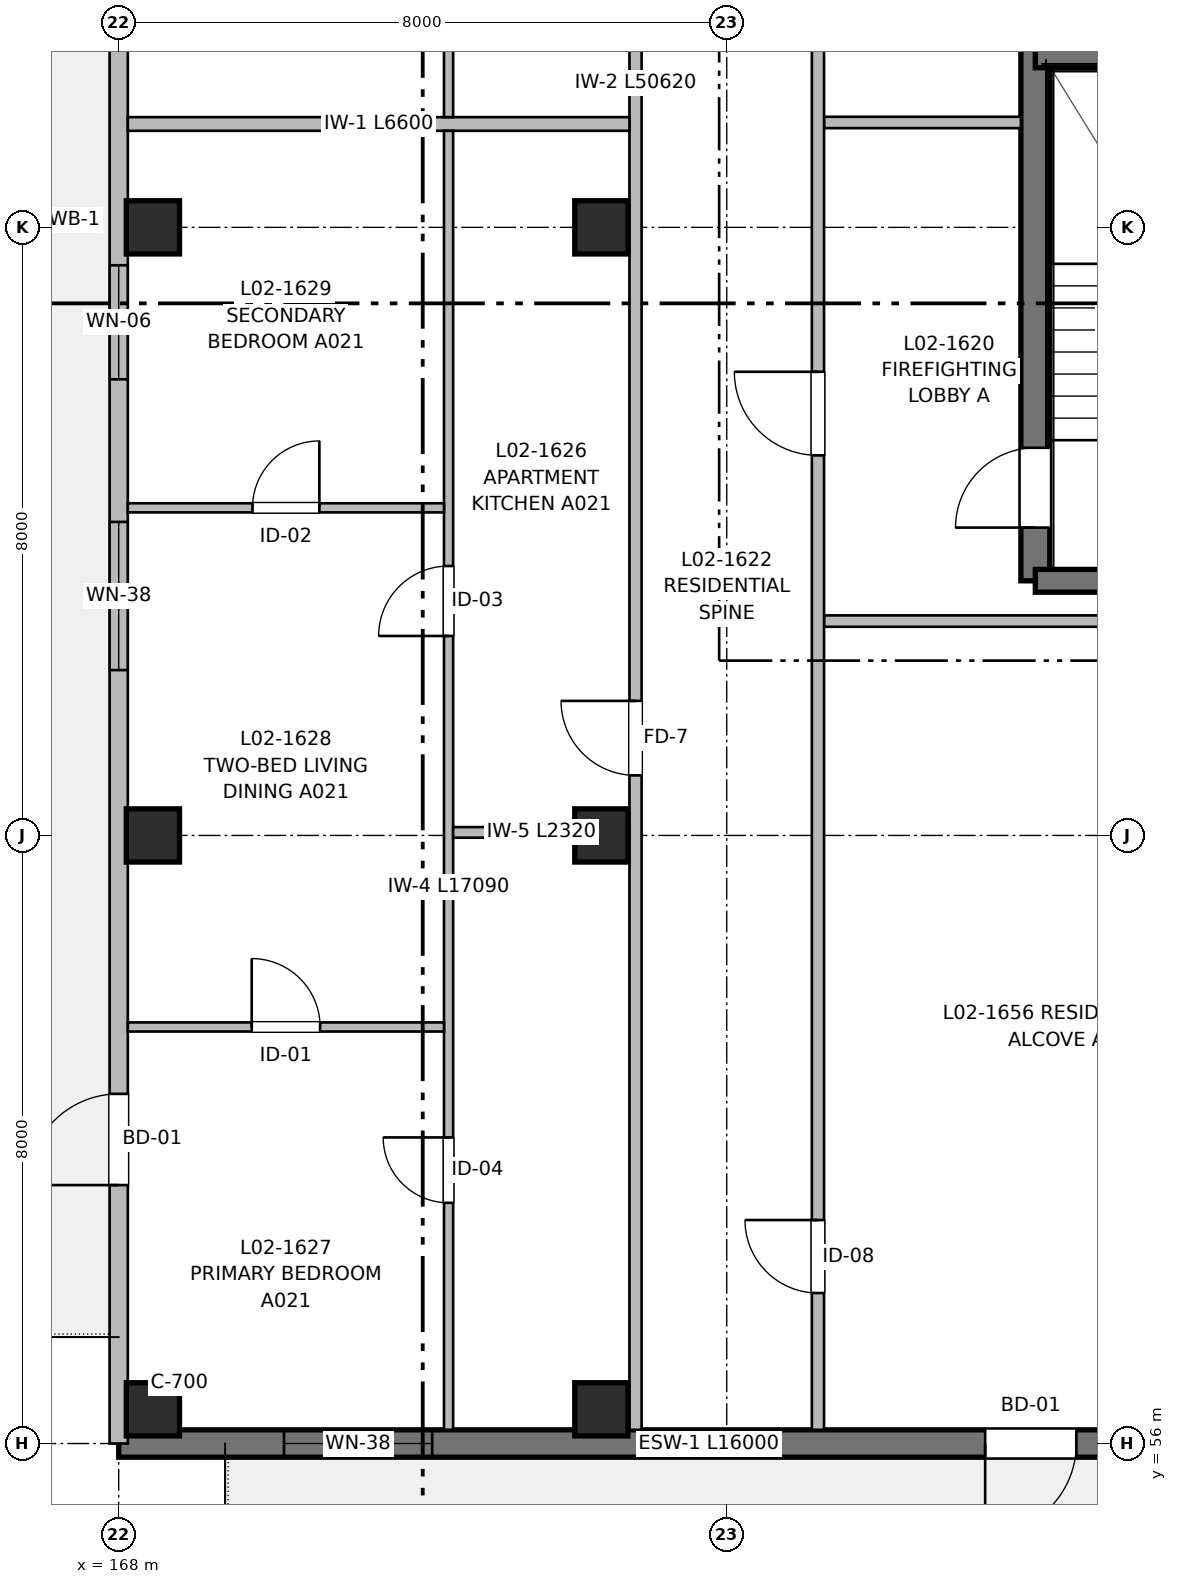
"""IFC4 building model, lengths in metres.
Left out: names, types, materials, properties, quantities, classifications, styles, units other than length and angle.
Written with IfcOpenShell. Run it as: python <this file> out.ifc"""

import sys

from ifc_helpers import new_model, si_unit, direction, frame, frame_2d, origin, origin_2d, place, context, subcontext, project, spatial, rectangle, extrude, element, fill, save


model = new_model("IFC4")
c1 = context("Model", 3, precision=1e-05, world=origin(), true_north=direction((0.0, 1.0)))
c2 = subcontext(c1, "Body", "Model", "MODEL_VIEW")
j1 = project(units=[si_unit("LENGTHUNIT", "METRE"), si_unit("PLANEANGLEUNIT", "RADIAN")], contexts=[c1])
p1 = place(None, origin())
s1 = spatial("IfcSite", under=j1, at=p1, CompositionType="ELEMENT")
p2 = place(p1, origin())
s2 = spatial("IfcBuilding", under=s1, at=p2, CompositionType="ELEMENT")
p3 = place(p2, frame((0.0, 0.0, 7.36)))
s3 = spatial("IfcBuildingStorey", under=s2, at=p3, CompositionType="ELEMENT", Elevation=7.36)
for number, where, z_axis, x_axis in (
    (1, (168.45, 56.45, 0.0), (0.0, 0.0, 1.0), (1.0, 0.0, 0.0)),
    (2, (168.45, 64.0, 0.0), (0.0, 0.0, 1.0), (1.0, 0.0, 0.0)),
    (3, (168.45, 72.0, 0.0), (0.0, 0.0, 1.0), (1.0, 0.0, 0.0)),
    (4, (174.35, 56.45, 0.0), (0.0, 0.0, 1.0), (1.0, 0.0, 0.0)),
    (5, (174.35, 64.0, 0.0), (0.0, 0.0, 1.0), (1.0, 0.0, 0.0)),
    (6, (174.35, 72.0, 0.0), (0.0, 0.0, 1.0), (1.0, 0.0, 0.0)),
):
    element("IfcColumn", number, at=place(p3, frame(where, z_axis=z_axis, x_axis=x_axis)), inside=s3, PredefinedType="COLUMN", context=c2, shape_type="SweptSolid", body=[
        extrude(rectangle(XDim=0.7, YDim=0.7, at=origin_2d()), origin(), (0.0, 0.0, 1.0), 3.2),
    ])
p4 = place(p3, frame((180.06, 67.35, 0.0), z_axis=(0.0, 0.0, 1.0), x_axis=(0.0, 1.0, 0.0)))
e7 = element("IfcWall", 7, at=p4, inside=s3, PredefinedType="SHEAR", context=c2, shape_type="SweptSolid", body=[
    extrude(rectangle(XDim=13.15, YDim=0.38, at=frame_2d((6.575, 0.0))), origin(), (0.0, 0.0, 1.0), 3.2),
])
p5 = place(p4, frame((0.7, 0.0, 0.0)))
e8 = element("IfcOpeningElement", 8, at=p5, cuts=e7, PredefinedType="OPENING", context=c2, shape_type="SweptSolid", body=[
    extrude(rectangle(XDim=1.05, YDim=2.15, at=frame_2d((0.525, 1.075))), frame((0.0, 0.2, 0.0), z_axis=(0.0, -1.0, 0.0), x_axis=(1.0, 0.0, 0.0)), (0.0, 0.0, 1.0), 0.4),
])
p6 = place(p3, frame((183.47, 67.35, 0.0), z_axis=(0.0, 0.0, 1.0), x_axis=(-1.0, 0.0, 0.0)))
e9 = element("IfcWall", 9, at=p6, inside=s3, PredefinedType="SHEAR", context=c2, shape_type="SweptSolid", body=[
    extrude(rectangle(XDim=3.41, YDim=0.3, at=frame_2d((1.705, 0.0))), origin(), (0.0, 0.0, 1.0), 3.2),
])
p7 = place(p3, frame((180.06, 74.24, 0.0), z_axis=(0.0, 0.0, 1.0), x_axis=(1.0, 0.0, 0.0)))
e10 = element("IfcWall", 10, at=p7, inside=s3, PredefinedType="SHEAR", context=c2, shape_type="SweptSolid", body=[
    extrude(rectangle(XDim=3.41, YDim=0.28, at=frame_2d((1.705, 0.0))), origin(), (0.0, 0.0, 1.0), 3.2),
])
p8 = place(p3, frame((184.0, 56.0, 0.0), z_axis=(0.0, 0.0, 1.0), x_axis=(-1.0, 0.0, 0.0)))
e11 = element("IfcWall", 11, at=p8, inside=s3, PredefinedType="SHEAR", context=c2, shape_type="SweptSolid", body=[
    extrude(rectangle(XDim=16.0, YDim=0.36, at=frame_2d((8.0, 0.0))), origin(), (0.0, 0.0, 1.0), 2.98),
])
p9 = place(p8, frame((3.4, 0.0, 0.0)))
e12 = element("IfcOpeningElement", 12, at=p9, cuts=e11, PredefinedType="OPENING", context=c2, shape_type="SweptSolid", body=[
    extrude(rectangle(XDim=1.2, YDim=2.2, at=frame_2d((0.6, 1.1))), frame((0.0, 0.19, 0.0), z_axis=(0.0, -1.0, 0.0), x_axis=(1.0, 0.0, 0.0)), (0.0, 0.0, 1.0), 0.38),
])
p10 = place(p8, frame((11.875, 0.0, 0.72)))
e13 = element("IfcOpeningElement", 13, at=p10, cuts=e11, PredefinedType="OPENING", context=c2, shape_type="SweptSolid", body=[
    extrude(rectangle(XDim=1.95, YDim=1.5, at=frame_2d((0.975, 0.75))), frame((0.0, 0.19, 0.0), z_axis=(0.0, -1.0, 0.0), x_axis=(1.0, 0.0, 0.0)), (0.0, 0.0, 1.0), 0.38),
])
p11 = place(p3, frame((168.0, 56.0, 0.0), z_axis=(0.0, 0.0, 1.0), x_axis=(0.0, 1.0, 0.0)))
e14 = element("IfcWall", 14, at=p11, inside=s3, PredefinedType="SOLIDWALL", context=c2, shape_type="SweptSolid", body=[
    extrude(rectangle(XDim=32.0, YDim=0.24, at=frame_2d((16.0, 0.0))), origin(), (0.0, 0.0, 1.0), 2.98),
])
p12 = place(p11, frame((3.4, 0.0, 0.0)))
e15 = element("IfcOpeningElement", 15, at=p12, cuts=e14, PredefinedType="OPENING", context=c2, shape_type="SweptSolid", body=[
    extrude(rectangle(XDim=1.2, YDim=2.2, at=frame_2d((0.6, 1.1))), frame((0.0, 0.13, 0.0), z_axis=(0.0, -1.0, 0.0), x_axis=(1.0, 0.0, 0.0)), (0.0, 0.0, 1.0), 0.26),
])
p13 = place(p11, frame((10.175, 0.0, 0.72)))
e16 = element("IfcOpeningElement", 16, at=p13, cuts=e14, PredefinedType="OPENING", context=c2, shape_type="SweptSolid", body=[
    extrude(rectangle(XDim=1.95, YDim=1.5, at=frame_2d((0.975, 0.75))), frame((0.0, 0.13, 0.0), z_axis=(0.0, -1.0, 0.0), x_axis=(1.0, 0.0, 0.0)), (0.0, 0.0, 1.0), 0.26),
])
p14 = place(p11, frame((18.7, 0.0, 0.67)))
e17 = element("IfcOpeningElement", 17, at=p14, cuts=e14, PredefinedType="OPENING", context=c2, shape_type="SweptSolid", body=[
    extrude(rectangle(XDim=2.6, YDim=1.55, at=frame_2d((1.3, 0.775))), frame((0.0, 0.13, 0.0), z_axis=(0.0, -1.0, 0.0), x_axis=(1.0, 0.0, 0.0)), (0.0, 0.0, 1.0), 0.26),
])
p15 = place(p11, frame((27.16, 0.0, 0.72)))
e18 = element("IfcOpeningElement", 18, at=p15, cuts=e14, PredefinedType="OPENING", context=c2, shape_type="SweptSolid", body=[
    extrude(rectangle(XDim=1.68, YDim=1.5, at=frame_2d((0.84, 0.75))), frame((0.0, 0.13, 0.0), z_axis=(0.0, -1.0, 0.0), x_axis=(1.0, 0.0, 0.0)), (0.0, 0.0, 1.0), 0.26),
])
p16 = place(p11, frame((14.001, 0.0, 0.82)))
e19 = element("IfcOpeningElement", 19, at=p16, cuts=e14, PredefinedType="OPENING", context=c2, shape_type="SweptSolid", body=[
    extrude(rectangle(XDim=1.5, YDim=1.4, at=frame_2d((0.75, 0.7))), frame((0.0, 0.13, 0.0), z_axis=(0.0, -1.0, 0.0), x_axis=(1.0, 0.0, 0.0)), (0.0, 0.0, 1.0), 0.26),
])
p17 = place(p11, frame((29.95, 0.0, 0.82)))
e20 = element("IfcOpeningElement", 20, at=p17, cuts=e14, PredefinedType="OPENING", context=c2, shape_type="SweptSolid", body=[
    extrude(rectangle(XDim=1.5, YDim=1.4, at=frame_2d((0.75, 0.7))), frame((0.0, 0.13, 0.0), z_axis=(0.0, -1.0, 0.0), x_axis=(1.0, 0.0, 0.0)), (0.0, 0.0, 1.0), 0.26),
])
p18 = place(p3, frame((177.28, 66.82, 0.0), z_axis=(0.0, 0.0, 1.0), x_axis=(1.0, 0.0, 0.0)))
e21 = element("IfcWall", 21, at=p18, inside=s3, PredefinedType="PARTITIONING", context=c2, shape_type="SweptSolid", body=[
    extrude(rectangle(XDim=6.6, YDim=0.15, at=frame_2d((3.3, 0.0))), origin(), (0.0, 0.0, 1.0), 2.935),
])
p19 = place(p3, frame((177.28, 73.38, 0.0), z_axis=(0.0, 0.0, 1.0), x_axis=(1.0, 0.0, 0.0)))
e22 = element("IfcWall", 22, at=p19, inside=s3, PredefinedType="PARTITIONING", context=c2, shape_type="SweptSolid", body=[
    extrude(rectangle(XDim=2.59, YDim=0.15, at=frame_2d((1.295, 0.0))), origin(), (0.0, 0.0, 1.0), 2.935),
])
p20 = place(p3, frame((174.8, 56.18, 0.0), z_axis=(0.0, 0.0, 1.0), x_axis=(0.0, 1.0, 0.0)))
e23 = element("IfcWall", 23, at=p20, inside=s3, PredefinedType="PARTITIONING", context=c2, shape_type="SweptSolid", body=[
    extrude(rectangle(XDim=50.62, YDim=0.16, at=frame_2d((25.31, 0.0))), origin(), (0.0, 0.0, 1.0), 2.935),
])
p21 = place(p20, frame((8.61, 0.0, 0.0)))
e24 = element("IfcOpeningElement", 24, at=p21, cuts=e23, PredefinedType="OPENING", context=c2, shape_type="SweptSolid", body=[
    extrude(rectangle(XDim=0.98, YDim=2.15, at=frame_2d((0.49, 1.075))), frame((0.0, 0.09, 0.0), z_axis=(0.0, -1.0, 0.0), x_axis=(1.0, 0.0, 0.0)), (0.0, 0.0, 1.0), 0.18),
])
p22 = place(p20, frame((25.84, 0.0, 0.0)))
e25 = element("IfcOpeningElement", 25, at=p22, cuts=e23, PredefinedType="OPENING", context=c2, shape_type="SweptSolid", body=[
    extrude(rectangle(XDim=0.98, YDim=2.15, at=frame_2d((0.49, 1.075))), frame((0.0, 0.09, 0.0), z_axis=(0.0, -1.0, 0.0), x_axis=(1.0, 0.0, 0.0)), (0.0, 0.0, 1.0), 0.18),
])
p23 = place(p20, frame((42.61, 0.0, 0.0)))
e26 = element("IfcOpeningElement", 26, at=p23, cuts=e23, PredefinedType="OPENING", context=c2, shape_type="SweptSolid", body=[
    extrude(rectangle(XDim=0.98, YDim=2.15, at=frame_2d((0.49, 1.075))), frame((0.0, 0.09, 0.0), z_axis=(0.0, -1.0, 0.0), x_axis=(1.0, 0.0, 0.0)), (0.0, 0.0, 1.0), 0.18),
])
p24 = place(p3, frame((177.2, 56.18, 0.0), z_axis=(0.0, 0.0, 1.0), x_axis=(0.0, 1.0, 0.0)))
e27 = element("IfcWall", 27, at=p24, inside=s3, PredefinedType="PARTITIONING", context=c2, shape_type="SweptSolid", body=[
    extrude(rectangle(XDim=50.62, YDim=0.16, at=frame_2d((25.31, 0.0))), origin(), (0.0, 0.0, 1.0), 2.935),
])
p25 = place(p24, frame((12.82, 0.0, 0.0)))
e28 = element("IfcOpeningElement", 28, at=p25, cuts=e27, PredefinedType="OPENING", context=c2, shape_type="SweptSolid", body=[
    extrude(rectangle(XDim=1.1, YDim=2.15, at=frame_2d((0.55, 1.075))), frame((0.0, 0.09, 0.0), z_axis=(0.0, -1.0, 0.0), x_axis=(1.0, 0.0, 0.0)), (0.0, 0.0, 1.0), 0.18),
])
p26 = place(p24, frame((19.22, 0.0, 0.0)))
e29 = element("IfcOpeningElement", 29, at=p26, cuts=e27, PredefinedType="OPENING", context=c2, shape_type="SweptSolid", body=[
    extrude(rectangle(XDim=1.6, YDim=2.15, at=frame_2d((0.8, 1.075))), frame((0.0, 0.09, 0.0), z_axis=(0.0, -1.0, 0.0), x_axis=(1.0, 0.0, 0.0)), (0.0, 0.0, 1.0), 0.18),
])
p27 = place(p24, frame((1.8, 0.0, 0.0)))
e30 = element("IfcOpeningElement", 30, at=p27, cuts=e27, PredefinedType="OPENING", context=c2, shape_type="SweptSolid", body=[
    extrude(rectangle(XDim=0.96, YDim=2.15, at=frame_2d((0.48, 1.075))), frame((0.0, 0.09, 0.0), z_axis=(0.0, -1.0, 0.0), x_axis=(1.0, 0.0, 0.0)), (0.0, 0.0, 1.0), 0.18),
])
p28 = place(p24, frame((33.15, 0.0, 0.0)))
e31 = element("IfcOpeningElement", 31, at=p28, cuts=e27, PredefinedType="OPENING", context=c2, shape_type="SweptSolid", body=[
    extrude(rectangle(XDim=0.98, YDim=2.15, at=frame_2d((0.49, 1.075))), frame((0.0, 0.09, 0.0), z_axis=(0.0, -1.0, 0.0), x_axis=(1.0, 0.0, 0.0)), (0.0, 0.0, 1.0), 0.18),
])
p29 = place(p24, frame((41.41, 0.0, 0.0)))
e32 = element("IfcOpeningElement", 32, at=p29, cuts=e27, PredefinedType="OPENING", context=c2, shape_type="SweptSolid", body=[
    extrude(rectangle(XDim=0.98, YDim=2.15, at=frame_2d((0.49, 1.075))), frame((0.0, 0.09, 0.0), z_axis=(0.0, -1.0, 0.0), x_axis=(1.0, 0.0, 0.0)), (0.0, 0.0, 1.0), 0.18),
])
p30 = place(p3, frame((168.12, 73.36, 0.0), z_axis=(0.0, 0.0, 1.0), x_axis=(1.0, 0.0, 0.0)))
e33 = element("IfcWall", 33, at=p30, inside=s3, PredefinedType="PARTITIONING", context=c2, shape_type="SweptSolid", body=[
    extrude(rectangle(XDim=6.6, YDim=0.18, at=frame_2d((3.3, 0.0))), origin(), (0.0, 0.0, 1.0), 2.935),
])
p31 = place(p3, frame((172.34, 56.18, 0.0), z_axis=(0.0, 0.0, 1.0), x_axis=(0.0, 1.0, 0.0)))
e34 = element("IfcWall", 34, at=p31, inside=s3, PredefinedType="PARTITIONING", context=c2, shape_type="SweptSolid", body=[
    extrude(rectangle(XDim=17.09, YDim=0.12, at=frame_2d((8.545, 0.0))), origin(), (0.0, 0.0, 1.0), 2.935),
])
p32 = place(p31, frame((2.987, 0.0, 0.0)))
e35 = element("IfcOpeningElement", 35, at=p32, cuts=e34, PredefinedType="OPENING", context=c2, shape_type="SweptSolid", body=[
    extrude(rectangle(XDim=0.86, YDim=2.1, at=frame_2d((0.43, 1.05))), frame((0.0, 0.07, 0.0), z_axis=(0.0, -1.0, 0.0), x_axis=(1.0, 0.0, 0.0)), (0.0, 0.0, 1.0), 0.14),
])
p33 = place(p31, frame((10.444, 0.0, 0.0)))
e36 = element("IfcOpeningElement", 36, at=p33, cuts=e34, PredefinedType="OPENING", context=c2, shape_type="SweptSolid", body=[
    extrude(rectangle(XDim=0.92, YDim=2.1, at=frame_2d((0.46, 1.05))), frame((0.0, 0.07, 0.0), z_axis=(0.0, -1.0, 0.0), x_axis=(1.0, 0.0, 0.0)), (0.0, 0.0, 1.0), 0.14),
])
p34 = place(p3, frame((172.4, 64.04, 0.0), z_axis=(0.0, 0.0, 1.0), x_axis=(1.0, 0.0, 0.0)))
e37 = element("IfcWall", 37, at=p34, inside=s3, PredefinedType="PARTITIONING", context=c2, shape_type="SweptSolid", body=[
    extrude(rectangle(XDim=2.32, YDim=0.14, at=frame_2d((1.16, 0.0))), origin(), (0.0, 0.0, 1.0), 2.53),
])
p35 = place(p3, frame((168.12, 61.48, 0.0), z_axis=(0.0, 0.0, 1.0), x_axis=(1.0, 0.0, 0.0)))
e38 = element("IfcWall", 38, at=p35, inside=s3, PredefinedType="PARTITIONING", context=c2, shape_type="SweptSolid", body=[
    extrude(rectangle(XDim=4.16, YDim=0.12, at=frame_2d((2.08, 0.0))), origin(), (0.0, 0.0, 1.0), 2.935),
])
p36 = place(p35, frame((1.63, 0.0, 0.0)))
e39 = element("IfcOpeningElement", 39, at=p36, cuts=e38, PredefinedType="OPENING", context=c2, shape_type="SweptSolid", body=[
    extrude(rectangle(XDim=0.9, YDim=2.1, at=frame_2d((0.45, 1.05))), frame((0.0, 0.07, 0.0), z_axis=(0.0, -1.0, 0.0), x_axis=(1.0, 0.0, 0.0)), (0.0, 0.0, 1.0), 0.14),
])
p37 = place(p3, frame((168.12, 68.31, 0.0), z_axis=(0.0, 0.0, 1.0), x_axis=(1.0, 0.0, 0.0)))
e40 = element("IfcWall", 40, at=p37, inside=s3, PredefinedType="PARTITIONING", context=c2, shape_type="SweptSolid", body=[
    extrude(rectangle(XDim=4.16, YDim=0.12, at=frame_2d((2.08, 0.0))), origin(), (0.0, 0.0, 1.0), 2.935),
])
p38 = place(p37, frame((1.64, 0.0, 0.0)))
e41 = element("IfcOpeningElement", 41, at=p38, cuts=e40, PredefinedType="OPENING", context=c2, shape_type="SweptSolid", body=[
    extrude(rectangle(XDim=0.88, YDim=2.1, at=frame_2d((0.44, 1.05))), frame((0.0, 0.07, 0.0), z_axis=(0.0, -1.0, 0.0), x_axis=(1.0, 0.0, 0.0)), (0.0, 0.0, 1.0), 0.14),
])
p39 = place(p3, frame((172.34, 73.45, 0.0), z_axis=(0.0, 0.0, 1.0), x_axis=(0.0, 1.0, 0.0)))
e42 = element("IfcWall", 42, at=p39, inside=s3, PredefinedType="PARTITIONING", context=c2, shape_type="SweptSolid", body=[
    extrude(rectangle(XDim=17.01, YDim=0.12, at=frame_2d((8.505, 0.0))), origin(), (0.0, 0.0, 1.0), 2.935),
])
p40 = place(p39, frame((2.972, 0.0, 0.0)))
e43 = element("IfcOpeningElement", 43, at=p40, cuts=e42, PredefinedType="OPENING", context=c2, shape_type="SweptSolid", body=[
    extrude(rectangle(XDim=0.86, YDim=2.1, at=frame_2d((0.43, 1.05))), frame((0.0, 0.07, 0.0), z_axis=(0.0, -1.0, 0.0), x_axis=(1.0, 0.0, 0.0)), (0.0, 0.0, 1.0), 0.14),
])
p41 = place(p39, frame((10.393, 0.0, 0.0)))
e44 = element("IfcOpeningElement", 44, at=p41, cuts=e42, PredefinedType="OPENING", context=c2, shape_type="SweptSolid", body=[
    extrude(rectangle(XDim=0.92, YDim=2.1, at=frame_2d((0.46, 1.05))), frame((0.0, 0.07, 0.0), z_axis=(0.0, -1.0, 0.0), x_axis=(1.0, 0.0, 0.0)), (0.0, 0.0, 1.0), 0.14),
])
p42 = place(p5, origin())
e45 = element("IfcDoor", 45, at=p42, inside=s3, OperationType="SINGLE_SWING_LEFT", PredefinedType="DOOR", context=c2, shape_type="SweptSolid", body=[
    extrude(rectangle(XDim=1.05, YDim=2.15, at=frame_2d((0.525, 1.075))), frame((0.0, 0.025, 0.0), z_axis=(0.0, -1.0, 0.0), x_axis=(1.0, 0.0, 0.0)), (0.0, 0.0, 1.0), 0.05),
])
fill(e8, e45)
p43 = place(p9, origin())
e46 = element("IfcDoor", 46, at=p43, inside=s3, OperationType="SINGLE_SWING_RIGHT", PredefinedType="DOOR", context=c2, shape_type="SweptSolid", body=[
    extrude(rectangle(XDim=1.2, YDim=2.2, at=frame_2d((0.6, 1.1))), frame((0.0, 0.025, 0.0), z_axis=(0.0, -1.0, 0.0), x_axis=(1.0, 0.0, 0.0)), (0.0, 0.0, 1.0), 0.05),
])
fill(e12, e46)
p44 = place(p10, origin())
e47 = element("IfcWindow", 47, at=p44, inside=s3, PartitioningType="SINGLE_PANEL", PredefinedType="WINDOW", context=c2, shape_type="SweptSolid", body=[
    extrude(rectangle(XDim=1.95, YDim=1.5, at=frame_2d((0.975, 0.75))), frame((0.0, 0.03, 0.0), z_axis=(0.0, -1.0, 0.0), x_axis=(1.0, 0.0, 0.0)), (0.0, 0.0, 1.0), 0.06),
])
fill(e13, e47)
p45 = place(p12, origin())
e48 = element("IfcDoor", 48, at=p45, inside=s3, OperationType="SINGLE_SWING_LEFT", PredefinedType="DOOR", context=c2, shape_type="SweptSolid", body=[
    extrude(rectangle(XDim=1.2, YDim=2.2, at=frame_2d((0.6, 1.1))), frame((0.0, 0.025, 0.0), z_axis=(0.0, -1.0, 0.0), x_axis=(1.0, 0.0, 0.0)), (0.0, 0.0, 1.0), 0.05),
])
fill(e15, e48)
p46 = place(p13, origin())
e49 = element("IfcWindow", 49, at=p46, inside=s3, PartitioningType="SINGLE_PANEL", PredefinedType="WINDOW", context=c2, shape_type="SweptSolid", body=[
    extrude(rectangle(XDim=1.95, YDim=1.5, at=frame_2d((0.975, 0.75))), frame((0.0, 0.03, 0.0), z_axis=(0.0, -1.0, 0.0), x_axis=(1.0, 0.0, 0.0)), (0.0, 0.0, 1.0), 0.06),
])
fill(e16, e49)
p47 = place(p25, origin())
e50 = element("IfcDoor", 50, at=p47, inside=s3, OperationType="SINGLE_SWING_RIGHT", PredefinedType="DOOR", context=c2, shape_type="SweptSolid", body=[
    extrude(rectangle(XDim=1.1, YDim=2.15, at=frame_2d((0.55, 1.075))), frame((0.0, 0.025, 0.0), z_axis=(0.0, -1.0, 0.0), x_axis=(1.0, 0.0, 0.0)), (0.0, 0.0, 1.0), 0.05),
])
fill(e28, e50)
p48 = place(p32, origin())
e51 = element("IfcDoor", 51, at=p48, inside=s3, OperationType="SINGLE_SWING_RIGHT", PredefinedType="DOOR", context=c2, shape_type="SweptSolid", body=[
    extrude(rectangle(XDim=0.86, YDim=2.1, at=frame_2d((0.43, 1.05))), frame((0.0, 0.025, 0.0), z_axis=(0.0, -1.0, 0.0), x_axis=(1.0, 0.0, 0.0)), (0.0, 0.0, 1.0), 0.05),
])
fill(e35, e51)
p49 = place(p33, origin())
e52 = element("IfcDoor", 52, at=p49, inside=s3, OperationType="SINGLE_SWING_LEFT", PredefinedType="DOOR", context=c2, shape_type="SweptSolid", body=[
    extrude(rectangle(XDim=0.92, YDim=2.1, at=frame_2d((0.46, 1.05))), frame((0.0, 0.025, 0.0), z_axis=(0.0, -1.0, 0.0), x_axis=(1.0, 0.0, 0.0)), (0.0, 0.0, 1.0), 0.05),
])
fill(e36, e52)
p50 = place(p21, origin())
e53 = element("IfcDoor", 53, at=p50, inside=s3, OperationType="SINGLE_SWING_RIGHT", PredefinedType="DOOR", context=c2, shape_type="SweptSolid", body=[
    extrude(rectangle(XDim=0.98, YDim=2.15, at=frame_2d((0.49, 1.075))), frame((0.0, 0.025, 0.0), z_axis=(0.0, -1.0, 0.0), x_axis=(1.0, 0.0, 0.0)), (0.0, 0.0, 1.0), 0.05),
])
fill(e24, e53)
p51 = place(p36, origin())
e54 = element("IfcDoor", 54, at=p51, inside=s3, OperationType="SINGLE_SWING_LEFT", PredefinedType="DOOR", context=c2, shape_type="SweptSolid", body=[
    extrude(rectangle(XDim=0.9, YDim=2.1, at=frame_2d((0.45, 1.05))), frame((0.0, 0.025, 0.0), z_axis=(0.0, -1.0, 0.0), x_axis=(1.0, 0.0, 0.0)), (0.0, 0.0, 1.0), 0.05),
])
fill(e39, e54)
p52 = place(p38, origin())
e55 = element("IfcDoor", 55, at=p52, inside=s3, OperationType="SINGLE_SWING_RIGHT", PredefinedType="DOOR", context=c2, shape_type="SweptSolid", body=[
    extrude(rectangle(XDim=0.88, YDim=2.1, at=frame_2d((0.44, 1.05))), frame((0.0, 0.025, 0.0), z_axis=(0.0, -1.0, 0.0), x_axis=(1.0, 0.0, 0.0)), (0.0, 0.0, 1.0), 0.05),
])
fill(e41, e55)
p53 = place(p27, origin())
e56 = element("IfcDoor", 56, at=p53, inside=s3, OperationType="SINGLE_SWING_RIGHT", PredefinedType="DOOR", context=c2, shape_type="SweptSolid", body=[
    extrude(rectangle(XDim=0.96, YDim=2.15, at=frame_2d((0.48, 1.075))), frame((0.0, 0.025, 0.0), z_axis=(0.0, -1.0, 0.0), x_axis=(1.0, 0.0, 0.0)), (0.0, 0.0, 1.0), 0.05),
])
fill(e30, e56)
p54 = place(p16, origin())
e57 = element("IfcWindow", 57, at=p54, inside=s3, PartitioningType="SINGLE_PANEL", PredefinedType="WINDOW", context=c2, shape_type="SweptSolid", body=[
    extrude(rectangle(XDim=1.5, YDim=1.4, at=frame_2d((0.75, 0.7))), frame((0.0, 0.03, 0.0), z_axis=(0.0, -1.0, 0.0), x_axis=(1.0, 0.0, 0.0)), (0.0, 0.0, 1.0), 0.06),
])
fill(e19, e57)
save(model, sys.argv[1])
